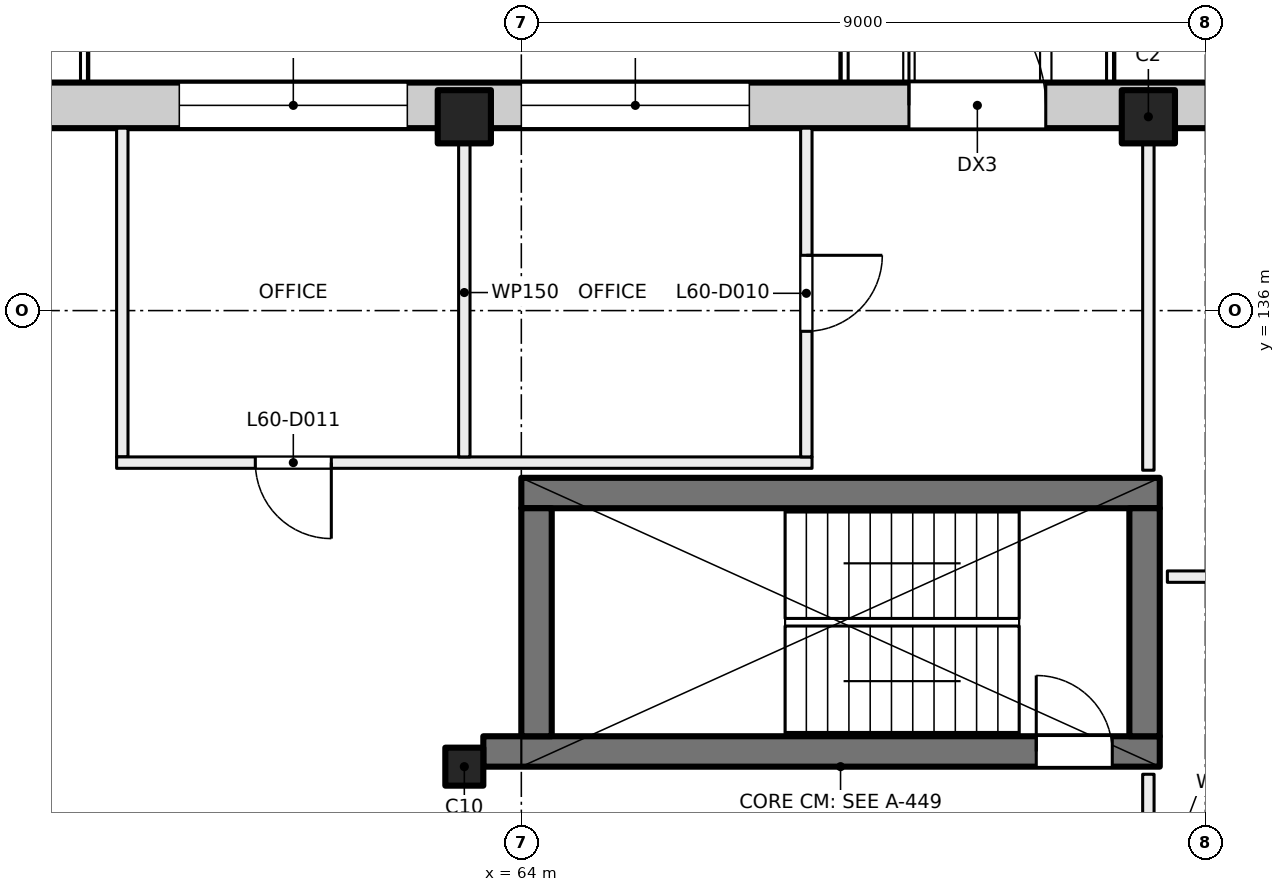
"""IFC4 building model, lengths in metres.
Left out: names, types, materials, properties, quantities, classifications, styles, units other than length and angle.
Written with IfcOpenShell. Run it as: python <this file> out.ifc"""

import sys

from ifc_helpers import new_model, si_unit, direction, frame, frame_2d, origin, origin_2d, place, context, subcontext, project, spatial, rectangle, extrude, element, fill, save


model = new_model("IFC4")
c1 = context("Model", 3, precision=1e-05, world=origin(), true_north=direction((0.0, 1.0)))
c2 = subcontext(c1, "Body", "Model", "MODEL_VIEW")
j1 = project(units=[si_unit("LENGTHUNIT", "METRE"), si_unit("PLANEANGLEUNIT", "RADIAN")], contexts=[c1])
p1 = place(None, origin())
s1 = spatial("IfcSite", under=j1, at=p1, CompositionType="ELEMENT")
p2 = place(p1, origin())
s2 = spatial("IfcBuilding", under=s1, at=p2, CompositionType="ELEMENT")
p3 = place(p2, frame((0.0, 0.0, 253.5)))
s3 = spatial("IfcBuildingStorey", under=s2, at=p3, CompositionType="ELEMENT", Elevation=253.5)
p4 = place(p3, frame((63.25, 130.0, 0.0), z_axis=(0.0, 0.0, 1.0), x_axis=(1.0, 0.0, 0.0)))
e1 = element("IfcColumn", 1, at=p4, inside=s3, PredefinedType="COLUMN", context=c2, shape_type="SweptSolid", body=[
    extrude(rectangle(XDim=0.5, YDim=0.5, at=origin_2d()), origin(), (0.0, 0.0, 1.0), 4.0),
])
for number, where, z_axis, x_axis in (
    (2, (63.25, 138.55, 0.0), (0.0, 0.0, 1.0), (1.0, 0.0, 0.0)),
    (3, (72.25, 138.55, 0.0), (0.0, 0.0, 1.0), (1.0, 0.0, 0.0)),
):
    element("IfcColumn", number, at=place(p3, frame(where, z_axis=z_axis, x_axis=x_axis)), inside=s3, PredefinedType="COLUMN", context=c2, shape_type="SweptSolid", body=[
        extrude(rectangle(XDim=0.7, YDim=0.7, at=origin_2d()), origin(), (0.0, 0.0, 1.0), 4.0),
    ])
p5 = place(p3, frame((63.5, 130.2, 0.0), z_axis=(0.0, 0.0, 1.0), x_axis=(1.0, 0.0, 0.0)))
e4 = element("IfcWall", 4, at=p5, inside=s3, PredefinedType="SHEAR", context=c2, shape_type="SweptSolid", body=[
    extrude(rectangle(XDim=8.9, YDim=0.4, at=frame_2d((4.45, 0.0))), origin(), (0.0, 0.0, 1.0), 4.0),
])
p6 = place(p5, frame((7.275, 0.0, 0.0)))
e5 = element("IfcOpeningElement", 5, at=p6, cuts=e4, PredefinedType="OPENING", context=c2, shape_type="SweptSolid", body=[
    extrude(rectangle(XDim=1.0, YDim=2.1, at=frame_2d((0.5, 1.05))), frame((0.0, 0.21, 0.0), z_axis=(0.0, -1.0, 0.0), x_axis=(1.0, 0.0, 0.0)), (0.0, 0.0, 1.0), 0.42),
])
p7 = place(p3, frame((64.0, 133.6, 0.0), z_axis=(0.0, 0.0, 1.0), x_axis=(1.0, 0.0, 0.0)))
e6 = element("IfcWall", 6, at=p7, inside=s3, PredefinedType="SHEAR", context=c2, shape_type="SweptSolid", body=[
    extrude(rectangle(XDim=8.4, YDim=0.4, at=frame_2d((4.2, 0.0))), origin(), (0.0, 0.0, 1.0), 4.0),
])
for number, where, z_axis, x_axis in (
    (7, (64.2, 130.4, 0.0), (0.0, 0.0, 1.0), (0.0, 1.0, 0.0)),
    (8, (72.2, 130.4, 0.0), (0.0, 0.0, 1.0), (0.0, 1.0, 0.0)),
):
    element("IfcWall", number, at=place(p3, frame(where, z_axis=z_axis, x_axis=x_axis)), inside=s3, PredefinedType="SHEAR", context=c2, shape_type="SweptSolid", body=[
        extrude(rectangle(XDim=3.0, YDim=0.4, at=frame_2d((1.5, 0.0))), origin(), (0.0, 0.0, 1.0), 4.0),
    ])
p8 = place(p3, frame((47.07, 138.7, 0.0), z_axis=(0.0, 0.0, 1.0), x_axis=(1.0, 0.0, 0.0)))
e9 = element("IfcWall", 9, at=p8, inside=s3, PredefinedType="SOLIDWALL", context=c2, shape_type="SweptSolid", body=[
    extrude(rectangle(XDim=43.91, YDim=0.6, at=frame_2d((21.955, 0.0))), origin(), (0.0, 0.0, 1.0), 3.625),
])
p9 = place(p8, frame((3.43, 0.0, 0.9)))
e10 = element("IfcOpeningElement", 10, at=p9, cuts=e9, PredefinedType="OPENING", context=c2, shape_type="SweptSolid", body=[
    extrude(rectangle(XDim=3.0, YDim=2.4, at=frame_2d((1.5, 1.2))), frame((0.0, 0.31, 0.0), z_axis=(0.0, -1.0, 0.0), x_axis=(1.0, 0.0, 0.0)), (0.0, 0.0, 1.0), 0.62),
])
p10 = place(p8, frame((8.53, 0.0, 0.0)))
e11 = element("IfcOpeningElement", 11, at=p10, cuts=e9, PredefinedType="OPENING", context=c2, shape_type="SweptSolid", body=[
    extrude(rectangle(XDim=1.8, YDim=2.4, at=frame_2d((0.9, 1.2))), frame((0.0, 0.31, 0.0), z_axis=(0.0, -1.0, 0.0), x_axis=(1.0, 0.0, 0.0)), (0.0, 0.0, 1.0), 0.62),
])
p11 = place(p8, frame((12.43, 0.0, 0.9)))
e12 = element("IfcOpeningElement", 12, at=p11, cuts=e9, PredefinedType="OPENING", context=c2, shape_type="SweptSolid", body=[
    extrude(rectangle(XDim=3.0, YDim=2.4, at=frame_2d((1.5, 1.2))), frame((0.0, 0.31, 0.0), z_axis=(0.0, -1.0, 0.0), x_axis=(1.0, 0.0, 0.0)), (0.0, 0.0, 1.0), 0.62),
])
p12 = place(p8, frame((16.93, 0.0, 0.9)))
e13 = element("IfcOpeningElement", 13, at=p12, cuts=e9, PredefinedType="OPENING", context=c2, shape_type="SweptSolid", body=[
    extrude(rectangle(XDim=3.0, YDim=2.4, at=frame_2d((1.5, 1.2))), frame((0.0, 0.31, 0.0), z_axis=(0.0, -1.0, 0.0), x_axis=(1.0, 0.0, 0.0)), (0.0, 0.0, 1.0), 0.62),
])
p13 = place(p8, frame((22.03, 0.0, 0.0)))
e14 = element("IfcOpeningElement", 14, at=p13, cuts=e9, PredefinedType="OPENING", context=c2, shape_type="SweptSolid", body=[
    extrude(rectangle(XDim=1.8, YDim=2.4, at=frame_2d((0.9, 1.2))), frame((0.0, 0.31, 0.0), z_axis=(0.0, -1.0, 0.0), x_axis=(1.0, 0.0, 0.0)), (0.0, 0.0, 1.0), 0.62),
])
p14 = place(p8, frame((25.93, 0.0, 0.9)))
e15 = element("IfcOpeningElement", 15, at=p14, cuts=e9, PredefinedType="OPENING", context=c2, shape_type="SweptSolid", body=[
    extrude(rectangle(XDim=3.0, YDim=2.4, at=frame_2d((1.5, 1.2))), frame((0.0, 0.31, 0.0), z_axis=(0.0, -1.0, 0.0), x_axis=(1.0, 0.0, 0.0)), (0.0, 0.0, 1.0), 0.62),
])
p15 = place(p8, frame((30.43, 0.0, 0.9)))
e16 = element("IfcOpeningElement", 16, at=p15, cuts=e9, PredefinedType="OPENING", context=c2, shape_type="SweptSolid", body=[
    extrude(rectangle(XDim=3.0, YDim=2.4, at=frame_2d((1.5, 1.2))), frame((0.0, 0.31, 0.0), z_axis=(0.0, -1.0, 0.0), x_axis=(1.0, 0.0, 0.0)), (0.0, 0.0, 1.0), 0.62),
])
p16 = place(p8, frame((34.93, 0.0, 0.9)))
e17 = element("IfcOpeningElement", 17, at=p16, cuts=e9, PredefinedType="OPENING", context=c2, shape_type="SweptSolid", body=[
    extrude(rectangle(XDim=3.0, YDim=2.4, at=frame_2d((1.5, 1.2))), frame((0.0, 0.31, 0.0), z_axis=(0.0, -1.0, 0.0), x_axis=(1.0, 0.0, 0.0)), (0.0, 0.0, 1.0), 0.62),
])
p17 = place(p8, frame((39.43, 0.0, 0.9)))
e18 = element("IfcOpeningElement", 18, at=p17, cuts=e9, PredefinedType="OPENING", context=c2, shape_type="SweptSolid", body=[
    extrude(rectangle(XDim=3.0, YDim=2.4, at=frame_2d((1.5, 1.2))), frame((0.0, 0.31, 0.0), z_axis=(0.0, -1.0, 0.0), x_axis=(1.0, 0.0, 0.0)), (0.0, 0.0, 1.0), 0.62),
])
p18 = place(p3, frame((58.75, 134.075, 0.0), z_axis=(0.0, 0.0, 1.0), x_axis=(0.0, 1.0, 0.0)))
e19 = element("IfcWall", 19, at=p18, inside=s3, PredefinedType="PARTITIONING", context=c2, shape_type="SweptSolid", body=[
    extrude(rectangle(XDim=4.325, YDim=0.15, at=frame_2d((2.163, 0.0))), origin(), (0.0, 0.0, 1.0), 3.625),
])
p19 = place(p3, frame((67.825, 134.0, 0.0), z_axis=(0.0, 0.0, 1.0), x_axis=(-1.0, 0.0, 0.0)))
e20 = element("IfcWall", 20, at=p19, inside=s3, PredefinedType="PARTITIONING", context=c2, shape_type="SweptSolid", body=[
    extrude(rectangle(XDim=9.15, YDim=0.15, at=frame_2d((4.575, 0.0))), origin(), (0.0, 0.0, 1.0), 3.625),
])
p20 = place(p19, frame((6.325, 0.0, 0.0)))
e21 = element("IfcOpeningElement", 21, at=p20, cuts=e20, PredefinedType="OPENING", context=c2, shape_type="SweptSolid", body=[
    extrude(rectangle(XDim=1.0, YDim=2.1, at=frame_2d((0.5, 1.05))), frame((0.0, 0.085, 0.0), z_axis=(0.0, -1.0, 0.0), x_axis=(1.0, 0.0, 0.0)), (0.0, 0.0, 1.0), 0.17),
])
p21 = place(p3, frame((63.25, 134.075, 0.0), z_axis=(0.0, 0.0, 1.0), x_axis=(0.0, 1.0, 0.0)))
e22 = element("IfcWall", 22, at=p21, inside=s3, PredefinedType="PARTITIONING", context=c2, shape_type="SweptSolid", body=[
    extrude(rectangle(XDim=4.325, YDim=0.15, at=frame_2d((2.163, 0.0))), origin(), (0.0, 0.0, 1.0), 3.625),
])
p22 = place(p3, frame((67.75, 138.4, 0.0), z_axis=(0.0, 0.0, 1.0), x_axis=(0.0, -1.0, 0.0)))
e23 = element("IfcWall", 23, at=p22, inside=s3, PredefinedType="PARTITIONING", context=c2, shape_type="SweptSolid", body=[
    extrude(rectangle(XDim=4.325, YDim=0.15, at=frame_2d((2.163, 0.0))), origin(), (0.0, 0.0, 1.0), 3.625),
])
p23 = place(p22, frame((1.673, 0.0, 0.0)))
e24 = element("IfcOpeningElement", 24, at=p23, cuts=e23, PredefinedType="OPENING", context=c2, shape_type="SweptSolid", body=[
    extrude(rectangle(XDim=1.0, YDim=2.1, at=frame_2d((0.5, 1.05))), frame((0.0, 0.085, 0.0), z_axis=(0.0, -1.0, 0.0), x_axis=(1.0, 0.0, 0.0)), (0.0, 0.0, 1.0), 0.17),
])
p24 = place(p3, frame((72.25, 126.0, 0.0), z_axis=(0.0, 0.0, 1.0), x_axis=(0.0, 1.0, 0.0)))
e25 = element("IfcWall", 25, at=p24, inside=s3, PredefinedType="PARTITIONING", context=c2, shape_type="SweptSolid", body=[
    extrude(rectangle(XDim=3.9, YDim=0.15, at=frame_2d((1.95, 0.0))), origin(), (0.0, 0.0, 1.0), 3.625),
])
p25 = place(p24, frame((1.05, 0.0, 0.0)))
e26 = element("IfcOpeningElement", 26, at=p25, cuts=e25, PredefinedType="OPENING", context=c2, shape_type="SweptSolid", body=[
    extrude(rectangle(XDim=1.8, YDim=2.1, at=frame_2d((0.9, 1.05))), frame((0.0, 0.085, 0.0), z_axis=(0.0, -1.0, 0.0), x_axis=(1.0, 0.0, 0.0)), (0.0, 0.0, 1.0), 0.17),
])
p26 = place(p3, frame((72.25, 133.9, 0.0), z_axis=(0.0, 0.0, 1.0), x_axis=(0.0, 1.0, 0.0)))
e27 = element("IfcWall", 27, at=p26, inside=s3, PredefinedType="PARTITIONING", context=c2, shape_type="SweptSolid", body=[
    extrude(rectangle(XDim=4.5, YDim=0.15, at=frame_2d((2.25, 0.0))), origin(), (0.0, 0.0, 1.0), 3.625),
])
p27 = place(p3, frame((76.675, 132.5, 0.0), z_axis=(0.0, 0.0, 1.0), x_axis=(-1.0, 0.0, 0.0)))
e28 = element("IfcWall", 28, at=p27, inside=s3, PredefinedType="PARTITIONING", context=c2, shape_type="SweptSolid", body=[
    extrude(rectangle(XDim=4.175, YDim=0.15, at=frame_2d((2.087, 0.0))), origin(), (0.0, 0.0, 1.0), 3.625),
])
p28 = place(p11, origin())
e29 = element("IfcWindow", 29, at=p28, inside=s3, PartitioningType="SINGLE_PANEL", PredefinedType="WINDOW", context=c2, shape_type="SweptSolid", body=[
    extrude(rectangle(XDim=3.0, YDim=2.4, at=frame_2d((1.5, 1.2))), frame((0.0, 0.03, 0.0), z_axis=(0.0, -1.0, 0.0), x_axis=(1.0, 0.0, 0.0)), (0.0, 0.0, 1.0), 0.06),
])
fill(e12, e29)
p29 = place(p12, origin())
e30 = element("IfcWindow", 30, at=p29, inside=s3, PartitioningType="SINGLE_PANEL", PredefinedType="WINDOW", context=c2, shape_type="SweptSolid", body=[
    extrude(rectangle(XDim=3.0, YDim=2.4, at=frame_2d((1.5, 1.2))), frame((0.0, 0.03, 0.0), z_axis=(0.0, -1.0, 0.0), x_axis=(1.0, 0.0, 0.0)), (0.0, 0.0, 1.0), 0.06),
])
fill(e13, e30)
p30 = place(p13, origin())
e31 = element("IfcDoor", 31, at=p30, inside=s3, OperationType="DOUBLE_DOOR_SINGLE_SWING", PredefinedType="DOOR", context=c2, shape_type="SweptSolid", body=[
    extrude(rectangle(XDim=1.8, YDim=2.4, at=frame_2d((0.9, 1.2))), frame((0.0, 0.025, 0.0), z_axis=(0.0, -1.0, 0.0), x_axis=(1.0, 0.0, 0.0)), (0.0, 0.0, 1.0), 0.05),
])
fill(e14, e31)
p31 = place(p6, origin())
e32 = element("IfcDoor", 32, at=p31, inside=s3, OperationType="SINGLE_SWING_LEFT", PredefinedType="DOOR", context=c2, shape_type="SweptSolid", body=[
    extrude(rectangle(XDim=1.0, YDim=2.1, at=frame_2d((0.5, 1.05))), frame((0.0, 0.025, 0.0), z_axis=(0.0, -1.0, 0.0), x_axis=(1.0, 0.0, 0.0)), (0.0, 0.0, 1.0), 0.05),
])
fill(e5, e32)
p32 = place(p23, origin())
e33 = element("IfcDoor", 33, at=p32, inside=s3, OperationType="SINGLE_SWING_LEFT", PredefinedType="DOOR", context=c2, shape_type="SweptSolid", body=[
    extrude(rectangle(XDim=1.0, YDim=2.1, at=frame_2d((0.5, 1.05))), frame((0.0, 0.025, 0.0), z_axis=(0.0, -1.0, 0.0), x_axis=(1.0, 0.0, 0.0)), (0.0, 0.0, 1.0), 0.05),
])
fill(e24, e33)
p33 = place(p20, origin())
e34 = element("IfcDoor", 34, at=p33, inside=s3, OperationType="SINGLE_SWING_RIGHT", PredefinedType="DOOR", context=c2, shape_type="SweptSolid", body=[
    extrude(rectangle(XDim=1.0, YDim=2.1, at=frame_2d((0.5, 1.05))), frame((0.0, 0.025, 0.0), z_axis=(0.0, -1.0, 0.0), x_axis=(1.0, 0.0, 0.0)), (0.0, 0.0, 1.0), 0.05),
])
fill(e21, e34)
save(model, sys.argv[1])
